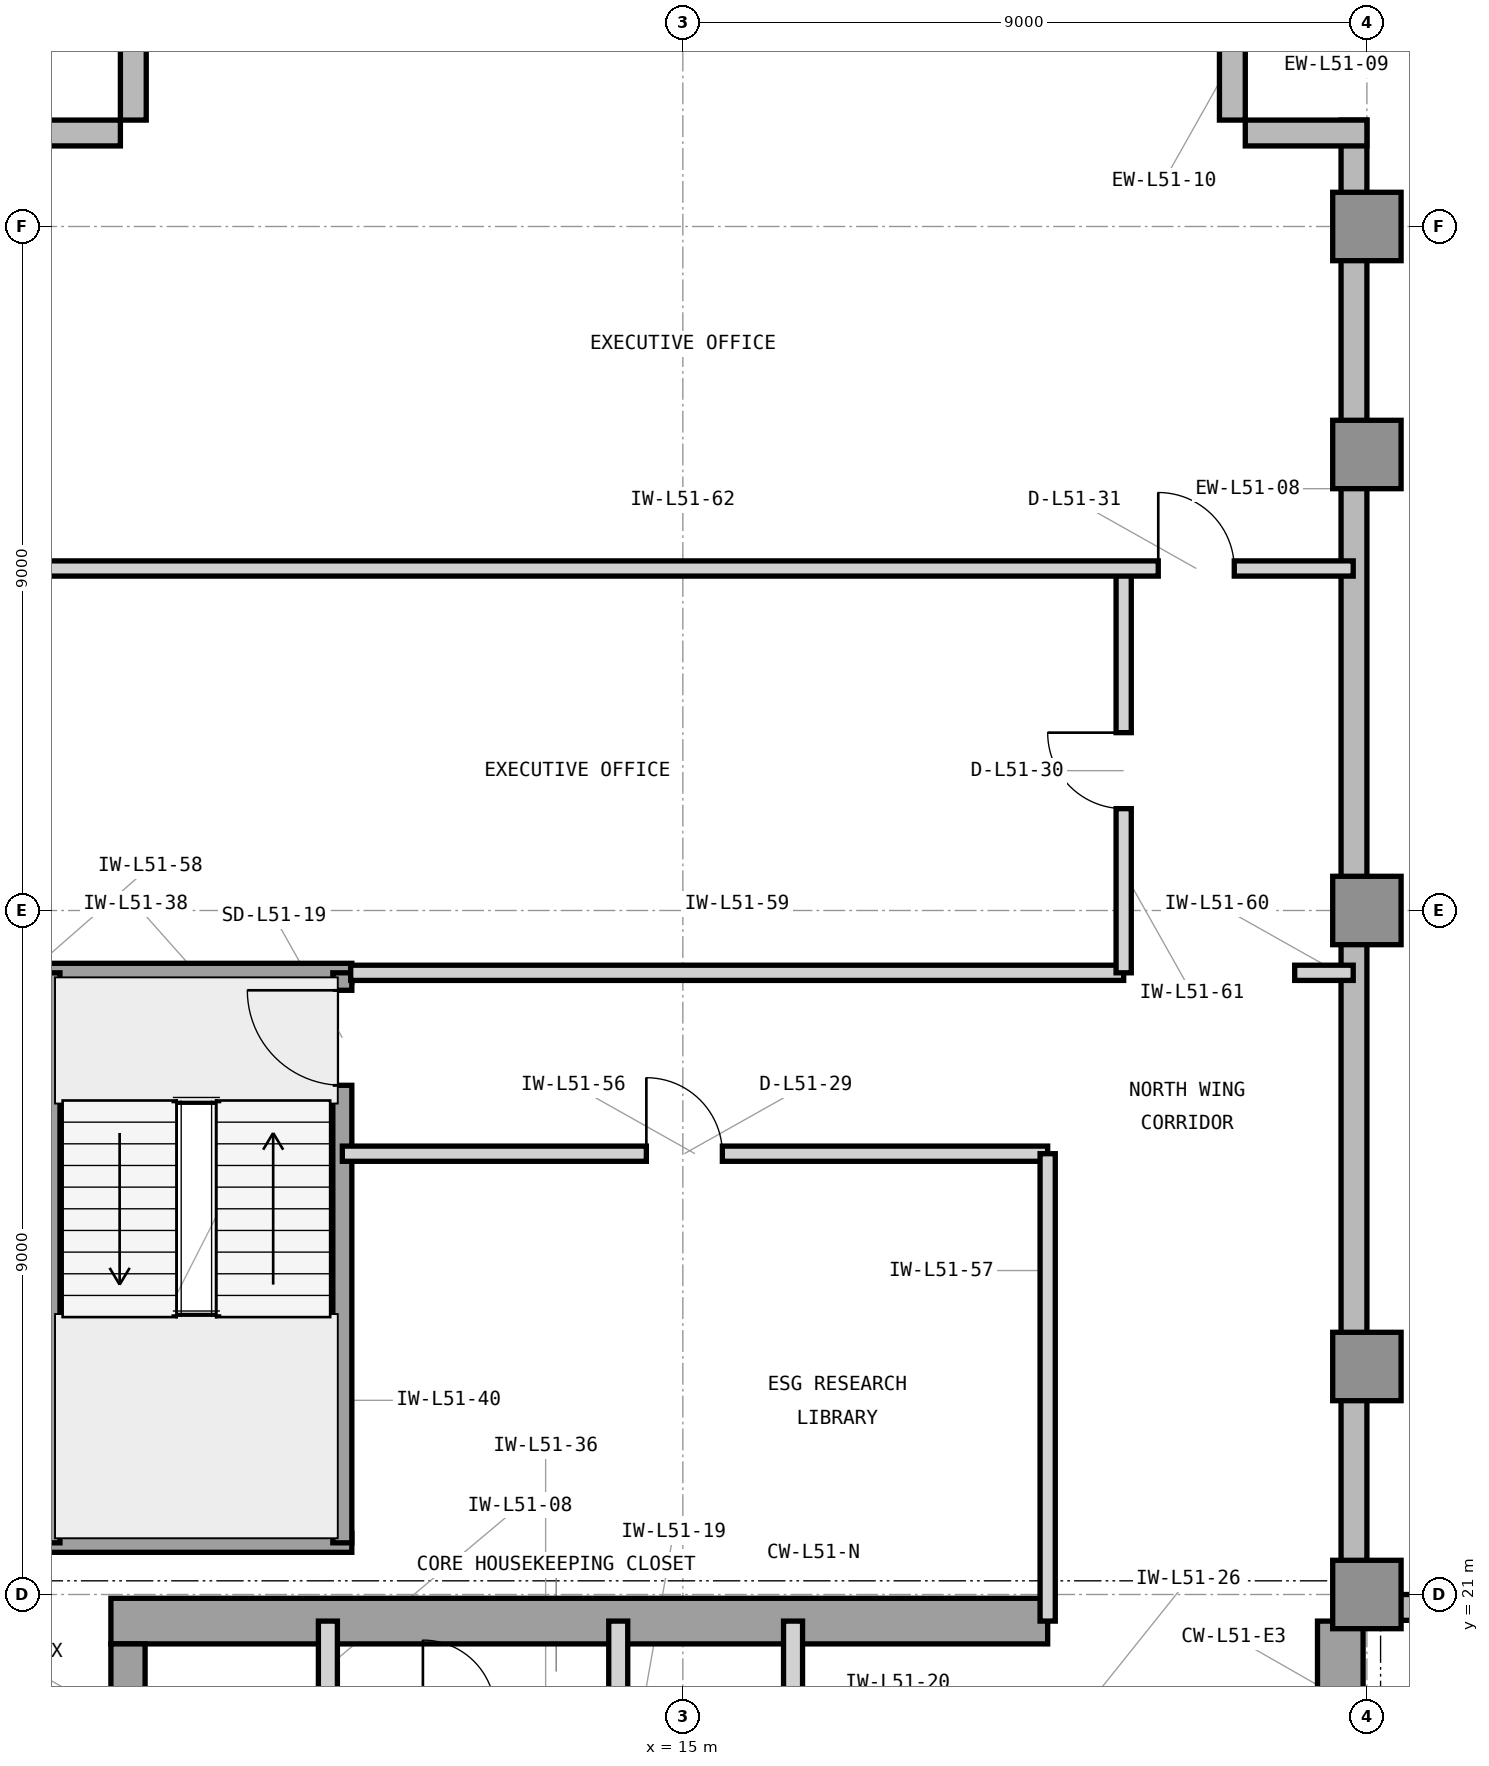
"""IFC4 building model, lengths in metres.
Left out: names, types, materials, properties, quantities, classifications, styles, units other than length and angle.
Written with IfcOpenShell. Run it as: python <this file> out.ifc"""

import sys

from ifc_helpers import new_model, si_unit, direction, frame, frame_2d, origin, origin_2d, place, context, subcontext, project, spatial, rectangle, extrude, element, fill, save


model = new_model("IFC4")
c1 = context("Model", 3, precision=1e-05, world=origin(), true_north=direction((0.0, 1.0)))
c2 = subcontext(c1, "Body", "Model", "MODEL_VIEW")
j1 = project(units=[si_unit("LENGTHUNIT", "METRE"), si_unit("PLANEANGLEUNIT", "RADIAN")], contexts=[c1])
p1 = place(None, origin())
s1 = spatial("IfcSite", under=j1, at=p1, CompositionType="ELEMENT")
p2 = place(p1, origin())
s2 = spatial("IfcBuilding", under=s1, at=p2, CompositionType="ELEMENT")
p3 = place(p2, frame((0.0, 0.0, 211.2)))
s3 = spatial("IfcBuildingStorey", under=s2, at=p3, CompositionType="ELEMENT", Elevation=211.2)
p4 = place(p3, frame((7.475, 20.65, 0.0), z_axis=(0.0, 0.0, 1.0), x_axis=(1.0, 0.0, 0.0)))
e1 = element("IfcWall", 1, at=p4, inside=s3, PredefinedType="SHEAR", context=c2, shape_type="SweptSolid", body=[
    extrude(rectangle(XDim=12.325, YDim=0.6, at=frame_2d((6.163, 0.0))), origin(), (0.0, 0.0, 1.0), 3.9),
])
p5 = place(p3, frame((23.65, 16.6, 0.0), z_axis=(0.0, 0.0, 1.0), x_axis=(0.0, 1.0, 0.0)))
e2 = element("IfcWall", 2, at=p5, inside=s3, PredefinedType="SHEAR", context=c2, shape_type="SweptSolid", body=[
    extrude(rectangle(XDim=4.05, YDim=0.6, at=frame_2d((2.025, 0.0))), origin(), (0.0, 0.0, 1.0), 3.9),
])
p6 = place(p3, frame((7.7, 19.575, 0.0), z_axis=(0.0, 0.0, 1.0), x_axis=(0.0, 1.0, 0.0)))
e3 = element("IfcWall", 3, at=p6, inside=s3, PredefinedType="SHEAR", context=c2, shape_type="SweptSolid", body=[
    extrude(rectangle(XDim=0.775, YDim=0.45, at=frame_2d((0.388, 0.0))), origin(), (0.0, 0.0, 1.0), 3.9),
])
for number, where, z_axis, x_axis in (
    (4, (24.0, 21.0, 0.0), (0.0, 0.0, 1.0), (1.0, 0.0, 0.0)),
    (5, (24.0, 24.0, 0.0), (0.0, 0.0, 1.0), (1.0, 0.0, 0.0)),
    (6, (24.0, 30.0, 0.0), (0.0, 0.0, 1.0), (1.0, 0.0, 0.0)),
    (7, (24.0, 36.0, 0.0), (0.0, 0.0, 1.0), (1.0, 0.0, 0.0)),
    (8, (24.0, 39.0, 0.0), (0.0, 0.0, 1.0), (1.0, 0.0, 0.0)),
):
    element("IfcColumn", number, at=place(p3, frame(where, z_axis=z_axis, x_axis=x_axis)), inside=s3, PredefinedType="COLUMN", context=c2, shape_type="SweptSolid", body=[
        extrude(rectangle(XDim=0.9, YDim=0.9, at=origin_2d()), origin(), (0.0, 0.0, 1.0), 3.9),
    ])
p7 = place(p3, frame((55.4, 20.83, 0.0), z_axis=(0.0, 0.0, 1.0), x_axis=(-1.0, 0.0, 0.0)))
e9 = element("IfcWall", 9, at=p7, inside=s3, PredefinedType="STANDARD", context=c2, shape_type="SweptSolid", body=[
    extrude(rectangle(XDim=31.4, YDim=0.34, at=frame_2d((15.7, 0.0))), origin(), (0.0, 0.0, 1.0), 3.7),
])
p8 = place(p7, frame((17.167, 0.0, 0.9)))
e10 = element("IfcOpeningElement", 10, at=p8, cuts=e9, PredefinedType="OPENING", context=c2, shape_type="SweptSolid", body=[
    extrude(rectangle(XDim=2.3, YDim=2.2, at=frame_2d((1.15, 1.1))), frame((0.0, 0.18, 0.0), z_axis=(0.0, -1.0, 0.0), x_axis=(1.0, 0.0, 0.0)), (0.0, 0.0, 1.0), 0.36),
])
p9 = place(p7, frame((23.825, 0.0, 0.9)))
e11 = element("IfcOpeningElement", 11, at=p9, cuts=e9, PredefinedType="OPENING", context=c2, shape_type="SweptSolid", body=[
    extrude(rectangle(XDim=2.3, YDim=2.2, at=frame_2d((1.15, 1.1))), frame((0.0, 0.18, 0.0), z_axis=(0.0, -1.0, 0.0), x_axis=(1.0, 0.0, 0.0)), (0.0, 0.0, 1.0), 0.36),
])
p10 = place(p7, frame((8.375, 0.0, 0.9)))
e12 = element("IfcOpeningElement", 12, at=p10, cuts=e9, PredefinedType="OPENING", context=c2, shape_type="SweptSolid", body=[
    extrude(rectangle(XDim=2.3, YDim=2.2, at=frame_2d((1.15, 1.1))), frame((0.0, 0.18, 0.0), z_axis=(0.0, -1.0, 0.0), x_axis=(1.0, 0.0, 0.0)), (0.0, 0.0, 1.0), 0.36),
])
p11 = place(p3, frame((23.83, 21.0, 0.0), z_axis=(0.0, 0.0, 1.0), x_axis=(0.0, 1.0, 0.0)))
e13 = element("IfcWall", 13, at=p11, inside=s3, PredefinedType="STANDARD", context=c2, shape_type="SweptSolid", body=[
    extrude(rectangle(XDim=19.4, YDim=0.34, at=frame_2d((9.7, 0.0))), origin(), (0.0, 0.0, 1.0), 3.7),
])
for number, where, z_axis, x_axis in (
    (14, (24.0, 40.23, 0.0), (0.0, 0.0, 1.0), (-1.0, 0.0, 0.0)),
    (15, (22.23, 40.4, 0.0), (0.0, 0.0, 1.0), (0.0, 1.0, 0.0)),
    (16, (7.77, 42.0, 0.0), (0.0, 0.0, 1.0), (0.0, -1.0, 0.0)),
    (17, (7.6, 40.23, 0.0), (0.0, 0.0, 1.0), (-1.0, 0.0, 0.0)),
):
    element("IfcWall", number, at=place(p3, frame(where, z_axis=z_axis, x_axis=x_axis)), inside=s3, PredefinedType="STANDARD", context=c2, shape_type="SweptSolid", body=[
        extrude(rectangle(XDim=1.6, YDim=0.34, at=frame_2d((0.8, 0.0))), origin(), (0.0, 0.0, 1.0), 3.7),
    ])
p12 = place(p3, frame((10.33, 19.45, 0.0), z_axis=(0.0, 0.0, 1.0), x_axis=(0.0, 1.0, 0.0)))
e18 = element("IfcWall", 18, at=p12, inside=s3, PredefinedType="PARTITIONING", context=c2, shape_type="SweptSolid", body=[
    extrude(rectangle(XDim=1.2, YDim=0.25, at=frame_2d((0.6, 0.0))), origin(), (0.0, 0.0, 1.0), 3.69),
])
for number, where, z_axis, x_axis in (
    (19, (14.15, 16.7, 0.0), (0.0, 0.0, 1.0), (0.0, 1.0, 0.0)),
    (20, (16.45, 16.7, 0.0), (0.0, 0.0, 1.0), (0.0, 1.0, 0.0)),
):
    element("IfcWall", number, at=place(p3, frame(where, z_axis=z_axis, x_axis=x_axis)), inside=s3, PredefinedType="PARTITIONING", context=c2, shape_type="SweptSolid", body=[
        extrude(rectangle(XDim=3.95, YDim=0.25, at=frame_2d((1.975, 0.0))), origin(), (0.0, 0.0, 1.0), 3.69),
    ])
for number, where, z_axis, x_axis in (
    (21, (6.555, 21.68, 0.0), (0.0, 0.0, 1.0), (1.0, 0.0, 0.0)),
    (22, (6.555, 29.18, 0.0), (0.0, 0.0, 1.0), (1.0, 0.0, 0.0)),
):
    element("IfcWall", number, at=place(p3, frame(where, z_axis=z_axis, x_axis=x_axis)), inside=s3, PredefinedType="SHEAR", context=c2, shape_type="SweptSolid", body=[
        extrude(rectangle(XDim=4.09, YDim=0.25, at=frame_2d((2.045, 0.0))), origin(), (0.0, 0.0, 1.0), 3.9),
    ])
p13 = place(p3, frame((6.68, 21.68, 0.0), z_axis=(0.0, 0.0, 1.0), x_axis=(0.0, 1.0, 0.0)))
e23 = element("IfcWall", 23, at=p13, inside=s3, PredefinedType="SHEAR", context=c2, shape_type="SweptSolid", body=[
    extrude(rectangle(XDim=7.5, YDim=0.25, at=frame_2d((3.75, 0.0))), origin(), (0.0, 0.0, 1.0), 3.9),
])
p14 = place(p3, frame((10.52, 21.68, 0.0), z_axis=(0.0, 0.0, 1.0), x_axis=(0.0, 1.0, 0.0)))
e24 = element("IfcWall", 24, at=p14, inside=s3, PredefinedType="SHEAR", context=c2, shape_type="SweptSolid", body=[
    extrude(rectangle(XDim=7.5, YDim=0.25, at=frame_2d((3.75, 0.0))), origin(), (0.0, 0.0, 1.0), 3.9),
])
p15 = place(p14, frame((6.02, 0.0, 0.0)))
e25 = element("IfcOpeningElement", 25, at=p15, cuts=e24, PredefinedType="OPENING", context=c2, shape_type="SweptSolid", body=[
    extrude(rectangle(XDim=1.25, YDim=2.2, at=frame_2d((0.625, 1.1))), frame((0.0, 0.135, 0.0), z_axis=(0.0, -1.0, 0.0), x_axis=(1.0, 0.0, 0.0)), (0.0, 0.0, 1.0), 0.27),
])
p16 = place(p3, frame((10.52, 26.8, 0.0), z_axis=(0.0, 0.0, 1.0), x_axis=(1.0, 0.0, 0.0)))
e26 = element("IfcWall", 26, at=p16, inside=s3, PredefinedType="PARTITIONING", context=c2, shape_type="SweptSolid", body=[
    extrude(rectangle(XDim=9.28, YDim=0.2, at=frame_2d((4.64, 0.0))), origin(), (0.0, 0.0, 1.0), 3.69),
])
p17 = place(p16, frame((4.0, 0.0, 0.0)))
e27 = element("IfcOpeningElement", 27, at=p17, cuts=e26, PredefinedType="OPENING", context=c2, shape_type="SweptSolid", body=[
    extrude(rectangle(XDim=1.0, YDim=2.15, at=frame_2d((0.5, 1.075))), frame((0.0, 0.11, 0.0), z_axis=(0.0, -1.0, 0.0), x_axis=(1.0, 0.0, 0.0)), (0.0, 0.0, 1.0), 0.22),
])
p18 = place(p3, frame((19.8, 20.65, 0.0), z_axis=(0.0, 0.0, 1.0), x_axis=(0.0, 1.0, 0.0)))
e28 = element("IfcWall", 28, at=p18, inside=s3, PredefinedType="PARTITIONING", context=c2, shape_type="SweptSolid", body=[
    extrude(rectangle(XDim=6.15, YDim=0.2, at=frame_2d((3.075, 0.0))), origin(), (0.0, 0.0, 1.0), 3.69),
])
p19 = place(p3, frame((10.63, 29.18, 0.0), z_axis=(0.0, 0.0, 1.0), x_axis=(1.0, 0.0, 0.0)))
e29 = element("IfcWall", 29, at=p19, inside=s3, PredefinedType="PARTITIONING", context=c2, shape_type="SweptSolid", body=[
    extrude(rectangle(XDim=10.17, YDim=0.2, at=frame_2d((5.085, 0.0))), origin(), (0.0, 0.0, 1.0), 3.69),
])
p20 = place(p3, frame((23.05, 29.18, 0.0), z_axis=(0.0, 0.0, 1.0), x_axis=(1.0, 0.0, 0.0)))
e30 = element("IfcWall", 30, at=p20, inside=s3, PredefinedType="PARTITIONING", context=c2, shape_type="SweptSolid", body=[
    extrude(rectangle(XDim=0.77, YDim=0.2, at=frame_2d((0.385, 0.0))), origin(), (0.0, 0.0, 1.0), 3.69),
])
p21 = place(p3, frame((20.8, 29.18, 0.0), z_axis=(0.0, 0.0, 1.0), x_axis=(0.0, 1.0, 0.0)))
e31 = element("IfcWall", 31, at=p21, inside=s3, PredefinedType="PARTITIONING", context=c2, shape_type="SweptSolid", body=[
    extrude(rectangle(XDim=5.32, YDim=0.2, at=frame_2d((2.66, 0.0))), origin(), (0.0, 0.0, 1.0), 3.69),
])
p22 = place(p21, frame((2.16, 0.0, 0.0)))
e32 = element("IfcOpeningElement", 32, at=p22, cuts=e31, PredefinedType="OPENING", context=c2, shape_type="SweptSolid", body=[
    extrude(rectangle(XDim=1.0, YDim=2.15, at=frame_2d((0.5, 1.075))), frame((0.0, 0.11, 0.0), z_axis=(0.0, -1.0, 0.0), x_axis=(1.0, 0.0, 0.0)), (0.0, 0.0, 1.0), 0.22),
])
p23 = place(p3, frame((6.18, 34.5, 0.0), z_axis=(0.0, 0.0, 1.0), x_axis=(1.0, 0.0, 0.0)))
e33 = element("IfcWall", 33, at=p23, inside=s3, PredefinedType="PARTITIONING", context=c2, shape_type="SweptSolid", body=[
    extrude(rectangle(XDim=17.64, YDim=0.2, at=frame_2d((8.82, 0.0))), origin(), (0.0, 0.0, 1.0), 3.69),
])
p24 = place(p23, frame((15.075, 0.0, 0.0)))
e34 = element("IfcOpeningElement", 34, at=p24, cuts=e33, PredefinedType="OPENING", context=c2, shape_type="SweptSolid", body=[
    extrude(rectangle(XDim=1.0, YDim=2.15, at=frame_2d((0.5, 1.075))), frame((0.0, 0.11, 0.0), z_axis=(0.0, -1.0, 0.0), x_axis=(1.0, 0.0, 0.0)), (0.0, 0.0, 1.0), 0.22),
])
p25 = place(p15, origin())
e35 = element("IfcDoor", 35, at=p25, inside=s3, OperationType="SINGLE_SWING_RIGHT", PredefinedType="DOOR", context=c2, shape_type="SweptSolid", body=[
    extrude(rectangle(XDim=1.25, YDim=2.2, at=frame_2d((0.625, 1.1))), frame((0.0, 0.025, 0.0), z_axis=(0.0, -1.0, 0.0), x_axis=(1.0, 0.0, 0.0)), (0.0, 0.0, 1.0), 0.05),
])
fill(e25, e35)
p26 = place(p17, origin())
e36 = element("IfcDoor", 36, at=p26, inside=s3, OperationType="SINGLE_SWING_LEFT", PredefinedType="DOOR", context=c2, shape_type="SweptSolid", body=[
    extrude(rectangle(XDim=1.0, YDim=2.15, at=frame_2d((0.5, 1.075))), frame((0.0, 0.025, 0.0), z_axis=(0.0, -1.0, 0.0), x_axis=(1.0, 0.0, 0.0)), (0.0, 0.0, 1.0), 0.05),
])
fill(e27, e36)
p27 = place(p22, origin())
e37 = element("IfcDoor", 37, at=p27, inside=s3, OperationType="SINGLE_SWING_RIGHT", PredefinedType="DOOR", context=c2, shape_type="SweptSolid", body=[
    extrude(rectangle(XDim=1.0, YDim=2.15, at=frame_2d((0.5, 1.075))), frame((0.0, 0.025, 0.0), z_axis=(0.0, -1.0, 0.0), x_axis=(1.0, 0.0, 0.0)), (0.0, 0.0, 1.0), 0.05),
])
fill(e32, e37)
p28 = place(p24, origin())
e38 = element("IfcDoor", 38, at=p28, inside=s3, OperationType="SINGLE_SWING_LEFT", PredefinedType="DOOR", context=c2, shape_type="SweptSolid", body=[
    extrude(rectangle(XDim=1.0, YDim=2.15, at=frame_2d((0.5, 1.075))), frame((0.0, 0.025, 0.0), z_axis=(0.0, -1.0, 0.0), x_axis=(1.0, 0.0, 0.0)), (0.0, 0.0, 1.0), 0.05),
])
fill(e34, e38)
save(model, sys.argv[1])
